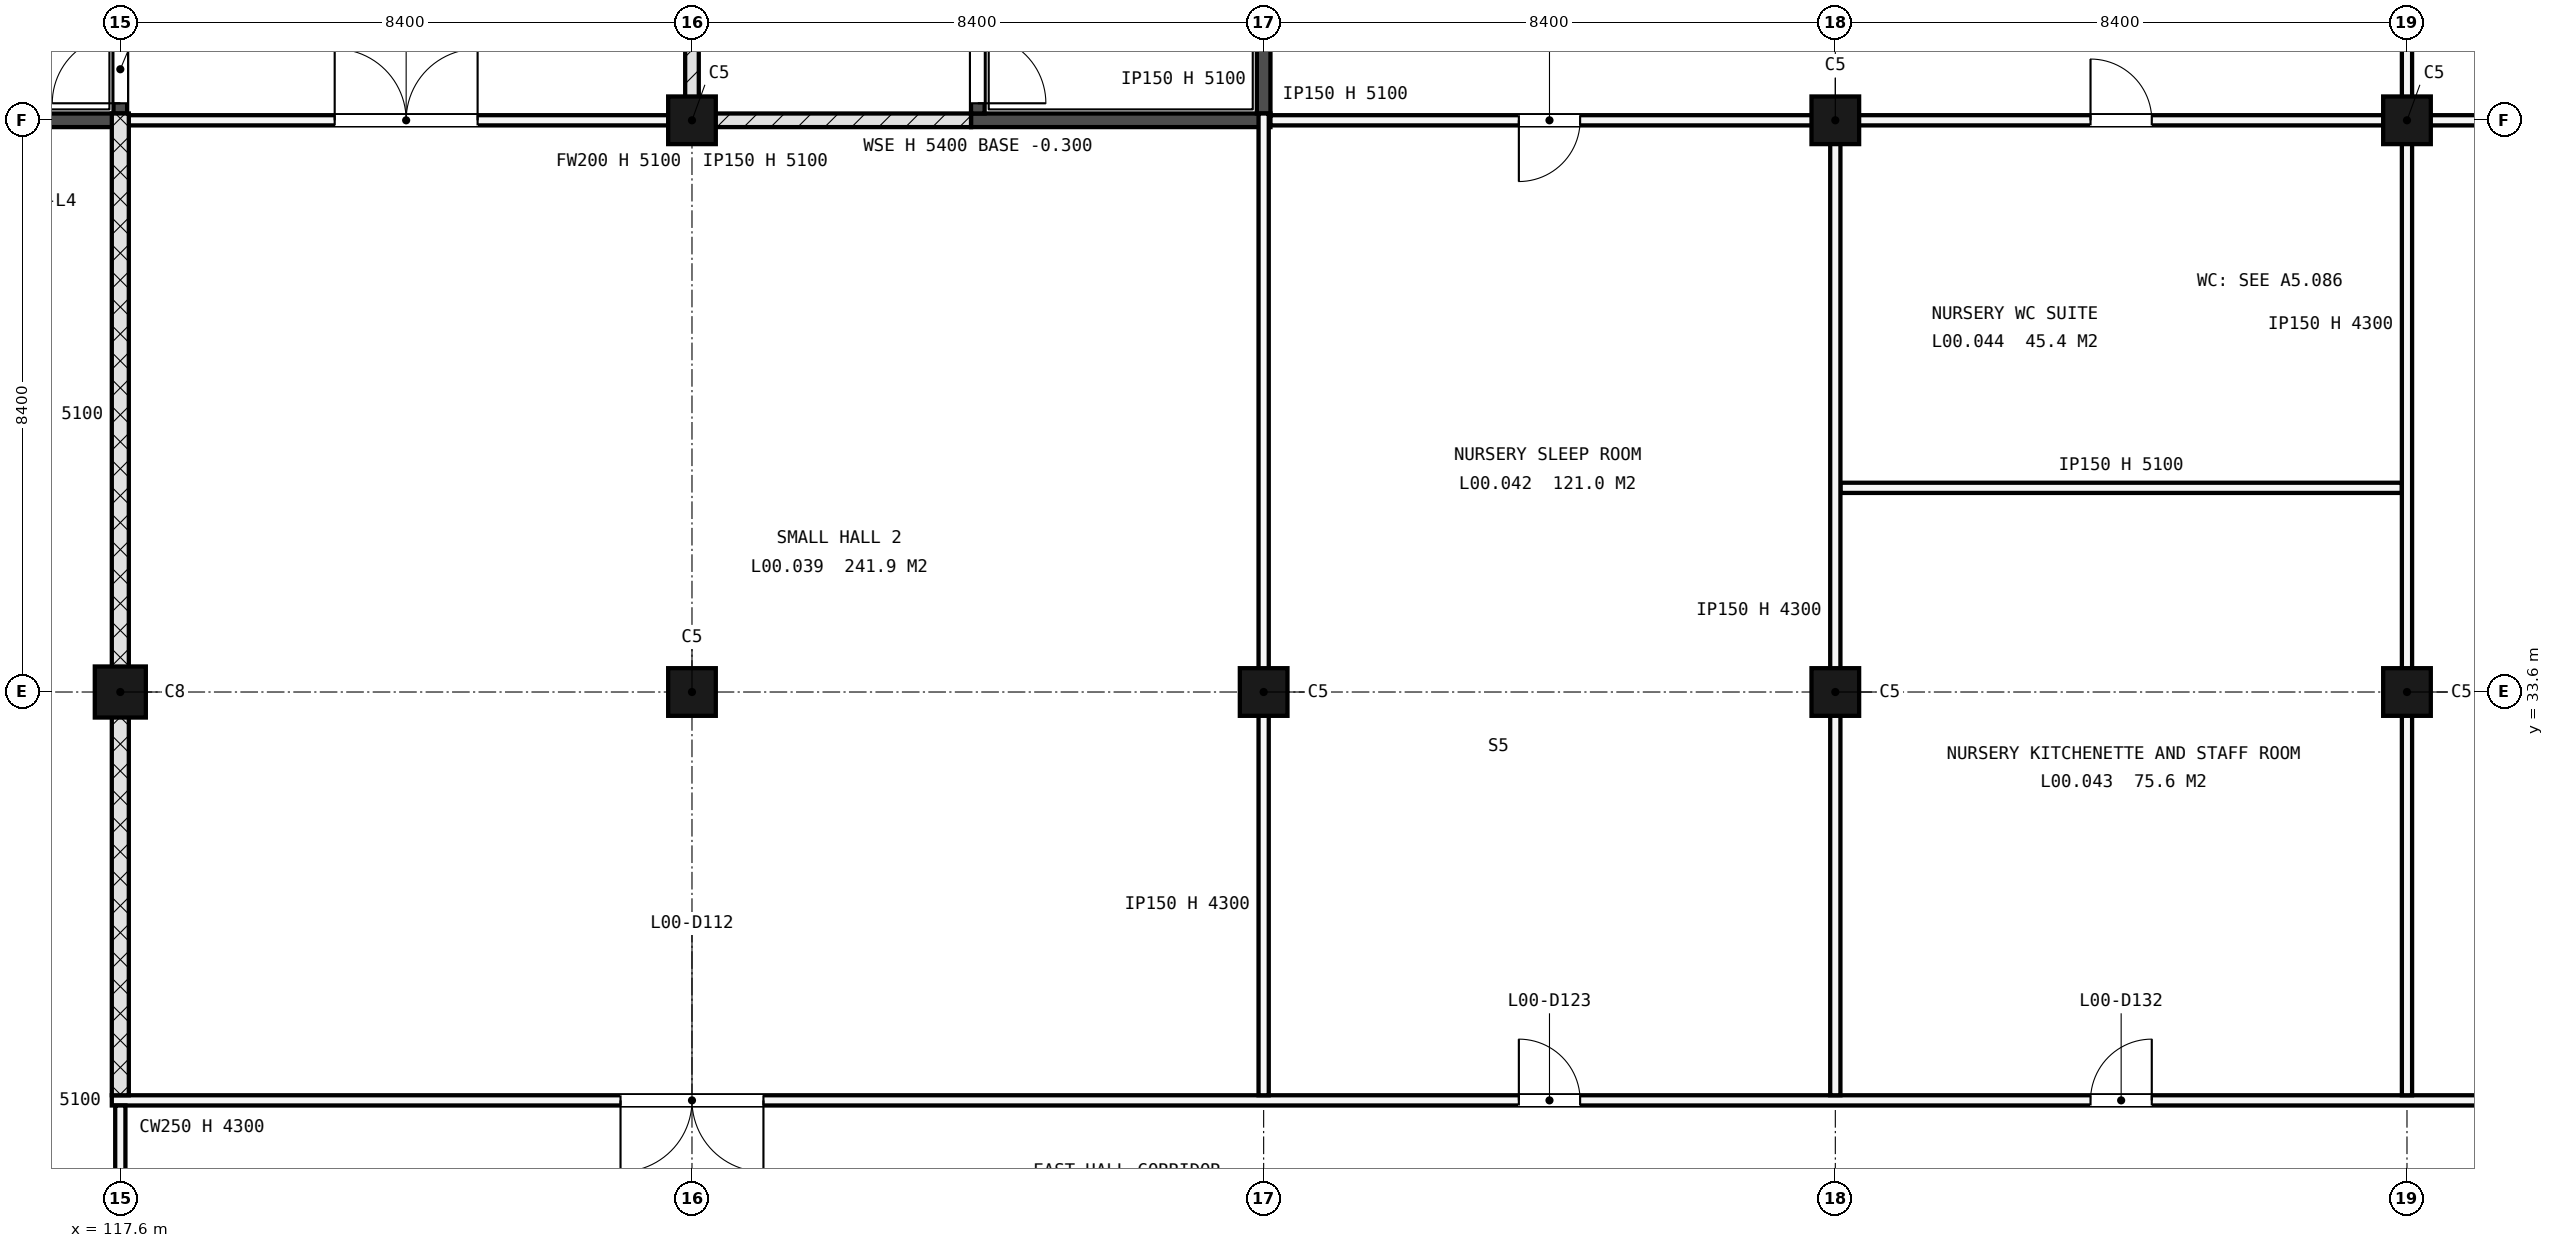
"""IFC4 building model, lengths in metres.
Left out: names, types, materials, properties, quantities, classifications, styles, units other than length and angle.
Written with IfcOpenShell. Run it as: python <this file> out.ifc"""

import sys

from ifc_helpers import new_model, si_unit, direction, frame, frame_2d, origin, origin_2d, place, context, subcontext, project, spatial, rectangle, extrude, element, fill, save


model = new_model("IFC4")
c1 = context("Model", 3, precision=1e-05, world=origin(), true_north=direction((0.0, 1.0)))
c2 = subcontext(c1, "Body", "Model", "MODEL_VIEW")
j1 = project(units=[si_unit("LENGTHUNIT", "METRE"), si_unit("PLANEANGLEUNIT", "RADIAN")], contexts=[c1])
p1 = place(None, origin())
s1 = spatial("IfcSite", under=j1, at=p1, CompositionType="ELEMENT")
p2 = place(p1, origin())
s2 = spatial("IfcBuilding", under=s1, at=p2, CompositionType="ELEMENT")
p3 = place(p2, origin())
s3 = spatial("IfcBuildingStorey", under=s2, at=p3, CompositionType="ELEMENT", Elevation=0.0)
p4 = place(p3, frame((117.6, 33.6, -0.3), z_axis=(0.0, 0.0, 1.0), x_axis=(1.0, 0.0, 0.0)))
e1 = element("IfcColumn", 1, at=p4, inside=s3, PredefinedType="COLUMN", context=c2, shape_type="SweptSolid", body=[
    extrude(rectangle(XDim=0.75, YDim=0.75, at=origin_2d()), origin(), (0.0, 0.0, 1.0), 5.4),
])
for number, where, z_axis, x_axis in (
    (2, (126.0, 33.6, -0.3), (0.0, 0.0, 1.0), (1.0, 0.0, 0.0)),
    (3, (126.0, 42.0, -0.3), (0.0, 0.0, 1.0), (1.0, 0.0, 0.0)),
    (4, (134.4, 33.6, -0.3), (0.0, 0.0, 1.0), (1.0, 0.0, 0.0)),
    (5, (142.8, 33.6, -0.3), (0.0, 0.0, 1.0), (1.0, 0.0, 0.0)),
    (6, (142.8, 42.0, -0.3), (0.0, 0.0, 1.0), (1.0, 0.0, 0.0)),
    (7, (151.2, 33.6, -0.3), (0.0, 0.0, 1.0), (1.0, 0.0, 0.0)),
    (8, (151.2, 42.0, -0.3), (0.0, 0.0, 1.0), (1.0, 0.0, 0.0)),
):
    element("IfcColumn", number, at=place(p3, frame(where, z_axis=z_axis, x_axis=x_axis)), inside=s3, PredefinedType="COLUMN", context=c2, shape_type="SweptSolid", body=[
        extrude(rectangle(XDim=0.7, YDim=0.7, at=origin_2d()), origin(), (0.0, 0.0, 1.0), 5.4),
    ])
p5 = place(p3, frame((130.1, 42.0, -0.3), z_axis=(0.0, 0.0, 1.0), x_axis=(1.0, 0.0, 0.0)))
e9 = element("IfcWall", 9, at=p5, inside=s3, PredefinedType="SHEAR", context=c2, shape_type="SweptSolid", body=[
    extrude(rectangle(XDim=4.4, YDim=0.2, at=frame_2d((2.2, 0.0))), origin(), (0.0, 0.0, 1.0), 5.4),
])
p6 = place(p3, frame((130.2, 42.1, -0.3), z_axis=(0.0, 0.0, 1.0), x_axis=(0.0, 1.0, 0.0)))
e10 = element("IfcWall", 10, at=p6, inside=s3, PredefinedType="SHEAR", context=c2, shape_type="SweptSolid", body=[
    extrude(rectangle(XDim=7.925, YDim=0.2, at=frame_2d((3.962, 0.0))), origin(), (0.0, 0.0, 1.0), 5.4),
])
p7 = place(p6, frame((0.15, 0.0, 0.3)))
e11 = element("IfcOpeningElement", 11, at=p7, cuts=e10, PredefinedType="OPENING", context=c2, shape_type="SweptSolid", body=[
    extrude(rectangle(XDim=1.0, YDim=2.1, at=frame_2d((0.5, 1.05))), frame((0.0, 0.11, 0.0), z_axis=(0.0, -1.0, 0.0), x_axis=(1.0, 0.0, 0.0)), (0.0, 0.0, 1.0), 0.22),
])
p8 = place(p3, frame((134.4, 42.1, -0.3), z_axis=(0.0, 0.0, 1.0), x_axis=(0.0, 1.0, 0.0)))
e12 = element("IfcWall", 12, at=p8, inside=s3, PredefinedType="SHEAR", context=c2, shape_type="SweptSolid", body=[
    extrude(rectangle(XDim=7.925, YDim=0.2, at=frame_2d((3.962, 0.0))), origin(), (0.0, 0.0, 1.0), 5.4),
])
p9 = place(p3, frame((113.3, 42.0, 0.0), z_axis=(0.0, 0.0, 1.0), x_axis=(1.0, 0.0, 0.0)))
e13 = element("IfcWall", 13, at=p9, inside=s3, PredefinedType="SHEAR", context=c2, shape_type="SweptSolid", body=[
    extrude(rectangle(XDim=4.4, YDim=0.2, at=frame_2d((2.2, 0.0))), origin(), (0.0, 0.0, 1.0), 5.1),
])
p10 = place(p3, frame((117.6, 42.1, 0.0), z_axis=(0.0, 0.0, 1.0), x_axis=(0.0, 1.0, 0.0)))
e14 = element("IfcWall", 14, at=p10, inside=s3, PredefinedType="SHEAR", context=c2, shape_type="SweptSolid", body=[
    extrude(rectangle(XDim=7.925, YDim=0.2, at=frame_2d((3.962, 0.0))), origin(), (0.0, 0.0, 1.0), 5.1),
])
p11 = place(p10, frame((0.15, 0.0, 0.0)))
e15 = element("IfcOpeningElement", 15, at=p11, cuts=e14, PredefinedType="OPENING", context=c2, shape_type="SweptSolid", body=[
    extrude(rectangle(XDim=1.0, YDim=2.1, at=frame_2d((0.5, 1.05))), frame((0.0, 0.11, 0.0), z_axis=(0.0, -1.0, 0.0), x_axis=(1.0, 0.0, 0.0)), (0.0, 0.0, 1.0), 0.22),
])
p12 = place(p3, frame((117.475, 27.6, 0.0), z_axis=(0.0, 0.0, 1.0), x_axis=(1.0, 0.0, 0.0)))
e16 = element("IfcWall", 16, at=p12, inside=s3, PredefinedType="PARTITIONING", context=c2, shape_type="SweptSolid", body=[
    extrude(rectangle(XDim=50.35, YDim=0.15, at=frame_2d((25.175, 0.0))), origin(), (0.0, 0.0, 1.0), 5.1),
])
p13 = place(p12, frame((7.475, 0.0, 0.0)))
e17 = element("IfcOpeningElement", 17, at=p13, cuts=e16, PredefinedType="OPENING", context=c2, shape_type="SweptSolid", body=[
    extrude(rectangle(XDim=2.1, YDim=2.1, at=frame_2d((1.05, 1.05))), frame((0.0, 0.085, 0.0), z_axis=(0.0, -1.0, 0.0), x_axis=(1.0, 0.0, 0.0)), (0.0, 0.0, 1.0), 0.17),
])
p14 = place(p12, frame((20.675, 0.0, 0.0)))
e18 = element("IfcOpeningElement", 18, at=p14, cuts=e16, PredefinedType="OPENING", context=c2, shape_type="SweptSolid", body=[
    extrude(rectangle(XDim=0.9, YDim=2.25, at=frame_2d((0.45, 1.125))), frame((0.0, 0.085, 0.0), z_axis=(0.0, -1.0, 0.0), x_axis=(1.0, 0.0, 0.0)), (0.0, 0.0, 1.0), 0.17),
])
p15 = place(p12, frame((29.075, 0.0, 0.0)))
e19 = element("IfcOpeningElement", 19, at=p15, cuts=e16, PredefinedType="OPENING", context=c2, shape_type="SweptSolid", body=[
    extrude(rectangle(XDim=0.9, YDim=2.25, at=frame_2d((0.45, 1.125))), frame((0.0, 0.085, 0.0), z_axis=(0.0, -1.0, 0.0), x_axis=(1.0, 0.0, 0.0)), (0.0, 0.0, 1.0), 0.17),
])
p16 = place(p12, frame((41.675, 0.0, 0.0)))
e20 = element("IfcOpeningElement", 20, at=p16, cuts=e16, PredefinedType="OPENING", context=c2, shape_type="SweptSolid", body=[
    extrude(rectangle(XDim=0.9, YDim=2.25, at=frame_2d((0.45, 1.125))), frame((0.0, 0.085, 0.0), z_axis=(0.0, -1.0, 0.0), x_axis=(1.0, 0.0, 0.0)), (0.0, 0.0, 1.0), 0.17),
])
p17 = place(p12, frame((37.025, 0.0, 0.0)))
e21 = element("IfcOpeningElement", 21, at=p17, cuts=e16, PredefinedType="OPENING", context=c2, shape_type="SweptSolid", body=[
    extrude(rectangle(XDim=0.9, YDim=2.25, at=frame_2d((0.45, 1.125))), frame((0.0, 0.085, 0.0), z_axis=(0.0, -1.0, 0.0), x_axis=(1.0, 0.0, 0.0)), (0.0, 0.0, 1.0), 0.17),
])
p18 = place(p3, frame((142.875, 36.6, 0.0), z_axis=(0.0, 0.0, 1.0), x_axis=(1.0, 0.0, 0.0)))
e22 = element("IfcWall", 22, at=p18, inside=s3, PredefinedType="PARTITIONING", context=c2, shape_type="SweptSolid", body=[
    extrude(rectangle(XDim=8.25, YDim=0.15, at=frame_2d((4.125, 0.0))), origin(), (0.0, 0.0, 1.0), 5.1),
])
p19 = place(p3, frame((117.7, 42.0, 0.0), z_axis=(0.0, 0.0, 1.0), x_axis=(1.0, 0.0, 0.0)))
e23 = element("IfcWall", 23, at=p19, inside=s3, PredefinedType="PARTITIONING", context=c2, shape_type="SweptSolid", body=[
    extrude(rectangle(XDim=8.3, YDim=0.15, at=frame_2d((4.15, 0.0))), origin(), (0.0, 0.0, 1.0), 5.1),
])
p20 = place(p19, frame((3.05, 0.0, 0.0)))
e24 = element("IfcOpeningElement", 24, at=p20, cuts=e23, PredefinedType="OPENING", context=c2, shape_type="SweptSolid", body=[
    extrude(rectangle(XDim=2.1, YDim=2.1, at=frame_2d((1.05, 1.05))), frame((0.0, 0.085, 0.0), z_axis=(0.0, -1.0, 0.0), x_axis=(1.0, 0.0, 0.0)), (0.0, 0.0, 1.0), 0.17),
])
p21 = place(p3, frame((126.0, 42.0, 0.0), z_axis=(0.0, 0.0, 1.0), x_axis=(1.0, 0.0, 0.0)))
e25 = element("IfcWall", 25, at=p21, inside=s3, PredefinedType="SOLIDWALL", context=c2, shape_type="SweptSolid", body=[
    extrude(rectangle(XDim=4.1, YDim=0.2, at=frame_2d((2.05, 0.0))), origin(), (0.0, 0.0, 1.0), 5.1),
])
p22 = place(p3, frame((134.5, 42.0, 0.0), z_axis=(0.0, 0.0, 1.0), x_axis=(1.0, 0.0, 0.0)))
e26 = element("IfcWall", 26, at=p22, inside=s3, PredefinedType="PARTITIONING", context=c2, shape_type="SweptSolid", body=[
    extrude(rectangle(XDim=8.63, YDim=0.15, at=frame_2d((4.315, 0.0))), origin(), (0.0, 0.0, 1.0), 5.1),
])
p23 = place(p22, frame((3.65, 0.0, 0.0)))
e27 = element("IfcOpeningElement", 27, at=p23, cuts=e26, PredefinedType="OPENING", context=c2, shape_type="SweptSolid", body=[
    extrude(rectangle(XDim=0.9, YDim=2.25, at=frame_2d((0.45, 1.125))), frame((0.0, 0.085, 0.0), z_axis=(0.0, -1.0, 0.0), x_axis=(1.0, 0.0, 0.0)), (0.0, 0.0, 1.0), 0.17),
])
p24 = place(p3, frame((143.13, 42.0, 0.0), z_axis=(0.0, 0.0, 1.0), x_axis=(1.0, 0.0, 0.0)))
e28 = element("IfcWall", 28, at=p24, inside=s3, PredefinedType="PARTITIONING", context=c2, shape_type="SweptSolid", body=[
    extrude(rectangle(XDim=16.14, YDim=0.15, at=frame_2d((8.07, 0.0))), origin(), (0.0, 0.0, 1.0), 4.3),
])
p25 = place(p24, frame((3.42, 0.0, 0.0)))
e29 = element("IfcOpeningElement", 29, at=p25, cuts=e28, PredefinedType="OPENING", context=c2, shape_type="SweptSolid", body=[
    extrude(rectangle(XDim=0.9, YDim=2.1, at=frame_2d((0.45, 1.05))), frame((0.0, 0.085, 0.0), z_axis=(0.0, -1.0, 0.0), x_axis=(1.0, 0.0, 0.0)), (0.0, 0.0, 1.0), 0.17),
])
p26 = place(p24, frame((13.92, 0.0, 0.0)))
e30 = element("IfcOpeningElement", 30, at=p26, cuts=e28, PredefinedType="OPENING", context=c2, shape_type="SweptSolid", body=[
    extrude(rectangle(XDim=0.9, YDim=2.25, at=frame_2d((0.45, 1.125))), frame((0.0, 0.085, 0.0), z_axis=(0.0, -1.0, 0.0), x_axis=(1.0, 0.0, 0.0)), (0.0, 0.0, 1.0), 0.17),
])
p27 = place(p3, frame((117.6, 25.275, 0.0), z_axis=(0.0, 0.0, 1.0), x_axis=(0.0, 1.0, 0.0)))
e31 = element("IfcWall", 31, at=p27, inside=s3, PredefinedType="PARTITIONING", context=c2, shape_type="SweptSolid", body=[
    extrude(rectangle(XDim=2.25, YDim=0.15, at=frame_2d((1.125, 0.0))), origin(), (0.0, 0.0, 1.0), 4.3),
])
p28 = place(p3, frame((117.6, 27.675, 0.0), z_axis=(0.0, 0.0, 1.0), x_axis=(0.0, 1.0, 0.0)))
e32 = element("IfcWall", 32, at=p28, inside=s3, PredefinedType="SOLIDWALL", context=c2, shape_type="SweptSolid", body=[
    extrude(rectangle(XDim=5.57, YDim=0.25, at=frame_2d((2.785, 0.0))), origin(), (0.0, 0.0, 1.0), 4.3),
])
p29 = place(p3, frame((117.6, 33.245, 0.0), z_axis=(0.0, 0.0, 1.0), x_axis=(0.0, 1.0, 0.0)))
e33 = element("IfcWall", 33, at=p29, inside=s3, PredefinedType="SOLIDWALL", context=c2, shape_type="SweptSolid", body=[
    extrude(rectangle(XDim=8.855, YDim=0.25, at=frame_2d((4.427, 0.0))), origin(), (0.0, 0.0, 1.0), 5.1),
])
p30 = place(p3, frame((126.0, 42.1, 0.0), z_axis=(0.0, 0.0, 1.0), x_axis=(0.0, 1.0, 0.0)))
e34 = element("IfcWall", 34, at=p30, inside=s3, PredefinedType="SOLIDWALL", context=c2, shape_type="SweptSolid", body=[
    extrude(rectangle(XDim=8.2, YDim=0.2, at=frame_2d((4.1, 0.0))), origin(), (0.0, 0.0, 1.0), 4.3),
])
p31 = place(p30, frame((6.45, 0.0, 0.0)))
e35 = element("IfcOpeningElement", 35, at=p31, cuts=e34, PredefinedType="OPENING", context=c2, shape_type="SweptSolid", body=[
    extrude(rectangle(XDim=0.8, YDim=2.1, at=frame_2d((0.4, 1.05))), frame((0.0, 0.11, 0.0), z_axis=(0.0, -1.0, 0.0), x_axis=(1.0, 0.0, 0.0)), (0.0, 0.0, 1.0), 0.22),
])
p32 = place(p30, frame((2.1, 0.0, 0.0)))
e36 = element("IfcOpeningElement", 36, at=p32, cuts=e34, PredefinedType="OPENING", context=c2, shape_type="SweptSolid", body=[
    extrude(rectangle(XDim=1.0, YDim=2.1, at=frame_2d((0.5, 1.05))), frame((0.0, 0.11, 0.0), z_axis=(0.0, -1.0, 0.0), x_axis=(1.0, 0.0, 0.0)), (0.0, 0.0, 1.0), 0.22),
])
p33 = place(p3, frame((134.4, 27.675, 0.0), z_axis=(0.0, 0.0, 1.0), x_axis=(0.0, 1.0, 0.0)))
e37 = element("IfcWall", 37, at=p33, inside=s3, PredefinedType="PARTITIONING", context=c2, shape_type="SweptSolid", body=[
    extrude(rectangle(XDim=5.595, YDim=0.15, at=frame_2d((2.797, 0.0))), origin(), (0.0, 0.0, 1.0), 4.3),
])
p34 = place(p3, frame((134.4, 33.27, 0.0), z_axis=(0.0, 0.0, 1.0), x_axis=(0.0, 1.0, 0.0)))
e38 = element("IfcWall", 38, at=p34, inside=s3, PredefinedType="PARTITIONING", context=c2, shape_type="SweptSolid", body=[
    extrude(rectangle(XDim=8.83, YDim=0.15, at=frame_2d((4.415, 0.0))), origin(), (0.0, 0.0, 1.0), 5.1),
])
p35 = place(p3, frame((142.8, 27.675, 0.0), z_axis=(0.0, 0.0, 1.0), x_axis=(0.0, 1.0, 0.0)))
e39 = element("IfcWall", 39, at=p35, inside=s3, PredefinedType="PARTITIONING", context=c2, shape_type="SweptSolid", body=[
    extrude(rectangle(XDim=14.25, YDim=0.15, at=frame_2d((7.125, 0.0))), origin(), (0.0, 0.0, 1.0), 4.3),
])
p36 = place(p3, frame((151.2, 27.675, 0.0), z_axis=(0.0, 0.0, 1.0), x_axis=(0.0, 1.0, 0.0)))
e40 = element("IfcWall", 40, at=p36, inside=s3, PredefinedType="PARTITIONING", context=c2, shape_type="SweptSolid", body=[
    extrude(rectangle(XDim=22.65, YDim=0.15, at=frame_2d((11.325, 0.0))), origin(), (0.0, 0.0, 1.0), 4.3),
])
p37 = place(p7, origin())
e41 = element("IfcDoor", 41, at=p37, inside=s3, OperationType="SINGLE_SWING_LEFT", PredefinedType="DOOR", context=c2, shape_type="SweptSolid", body=[
    extrude(rectangle(XDim=1.0, YDim=2.1, at=frame_2d((0.5, 1.05))), frame((0.0, 0.025, 0.0), z_axis=(0.0, -1.0, 0.0), x_axis=(1.0, 0.0, 0.0)), (0.0, 0.0, 1.0), 0.05),
])
fill(e11, e41)
p38 = place(p11, origin())
e42 = element("IfcDoor", 42, at=p38, inside=s3, OperationType="SINGLE_SWING_RIGHT", PredefinedType="DOOR", context=c2, shape_type="SweptSolid", body=[
    extrude(rectangle(XDim=1.0, YDim=2.1, at=frame_2d((0.5, 1.05))), frame((0.0, 0.025, 0.0), z_axis=(0.0, -1.0, 0.0), x_axis=(1.0, 0.0, 0.0)), (0.0, 0.0, 1.0), 0.05),
])
fill(e15, e42)
p39 = place(p20, origin())
e43 = element("IfcDoor", 43, at=p39, inside=s3, OperationType="DOUBLE_DOOR_SINGLE_SWING", PredefinedType="DOOR", context=c2, shape_type="SweptSolid", body=[
    extrude(rectangle(XDim=2.1, YDim=2.1, at=frame_2d((1.05, 1.05))), frame((0.0, 0.025, 0.0), z_axis=(0.0, -1.0, 0.0), x_axis=(1.0, 0.0, 0.0)), (0.0, 0.0, 1.0), 0.05),
])
fill(e24, e43)
p40 = place(p13, origin())
e44 = element("IfcDoor", 44, at=p40, inside=s3, OperationType="DOUBLE_DOOR_SINGLE_SWING", PredefinedType="DOOR", context=c2, shape_type="SweptSolid", body=[
    extrude(rectangle(XDim=2.1, YDim=2.1, at=frame_2d((1.05, 1.05))), frame((0.0, 0.025, 0.0), z_axis=(0.0, -1.0, 0.0), x_axis=(1.0, 0.0, 0.0)), (0.0, 0.0, 1.0), 0.05),
])
fill(e17, e44)
p41 = place(p14, origin())
e45 = element("IfcDoor", 45, at=p41, inside=s3, OperationType="SINGLE_SWING_RIGHT", PredefinedType="DOOR", context=c2, shape_type="SweptSolid", body=[
    extrude(rectangle(XDim=0.9, YDim=2.25, at=frame_2d((0.45, 1.125))), frame((0.0, 0.025, 0.0), z_axis=(0.0, -1.0, 0.0), x_axis=(1.0, 0.0, 0.0)), (0.0, 0.0, 1.0), 0.05),
])
fill(e18, e45)
p42 = place(p15, origin())
e46 = element("IfcDoor", 46, at=p42, inside=s3, OperationType="SINGLE_SWING_LEFT", PredefinedType="DOOR", context=c2, shape_type="SweptSolid", body=[
    extrude(rectangle(XDim=0.9, YDim=2.25, at=frame_2d((0.45, 1.125))), frame((0.0, 0.025, 0.0), z_axis=(0.0, -1.0, 0.0), x_axis=(1.0, 0.0, 0.0)), (0.0, 0.0, 1.0), 0.05),
])
fill(e19, e46)
p43 = place(p25, origin())
e47 = element("IfcDoor", 47, at=p43, inside=s3, OperationType="SINGLE_SWING_RIGHT", PredefinedType="DOOR", context=c2, shape_type="SweptSolid", body=[
    extrude(rectangle(XDim=0.9, YDim=2.1, at=frame_2d((0.45, 1.05))), frame((0.0, 0.025, 0.0), z_axis=(0.0, -1.0, 0.0), x_axis=(1.0, 0.0, 0.0)), (0.0, 0.0, 1.0), 0.05),
])
fill(e29, e47)
p44 = place(p23, origin())
e48 = element("IfcDoor", 48, at=p44, inside=s3, OperationType="SINGLE_SWING_LEFT", PredefinedType="DOOR", context=c2, shape_type="SweptSolid", body=[
    extrude(rectangle(XDim=0.9, YDim=2.25, at=frame_2d((0.45, 1.125))), frame((0.0, 0.025, 0.0), z_axis=(0.0, -1.0, 0.0), x_axis=(1.0, 0.0, 0.0)), (0.0, 0.0, 1.0), 0.05),
])
fill(e27, e48)
save(model, sys.argv[1])
